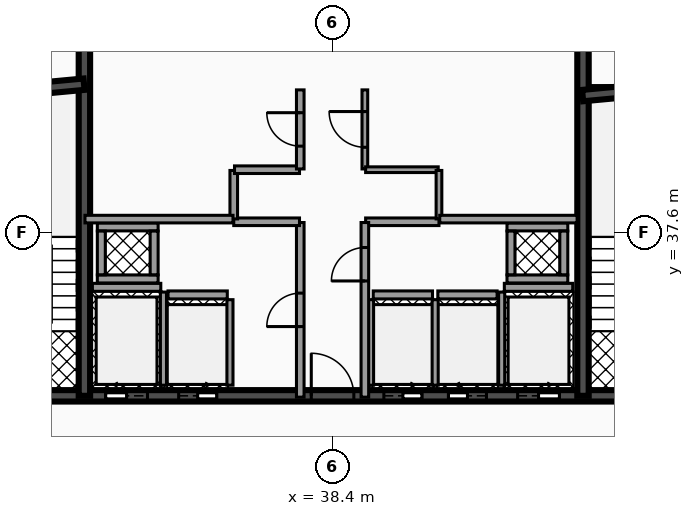
"""IFC4 building model, lengths in metres.
Left out: names, types, materials, properties, quantities, classifications, styles, units other than length and angle.
Written with IfcOpenShell. Run it as: python <this file> out.ifc"""

import sys

from ifc_helpers import new_model, si_unit, direction, frame, frame_2d, origin, place, context, subcontext, project, spatial, rectangle, extrude, element, fill, save


model = new_model("IFC4")
c1 = context("Model", 3, precision=1e-05, world=origin(), true_north=direction((0.0, 1.0)))
c2 = subcontext(c1, "Body", "Model", "MODEL_VIEW")
j1 = project(units=[si_unit("LENGTHUNIT", "METRE"), si_unit("PLANEANGLEUNIT", "RADIAN")], contexts=[c1])
p1 = place(None, origin())
s1 = spatial("IfcSite", under=j1, at=p1, CompositionType="ELEMENT")
p2 = place(p1, origin())
s2 = spatial("IfcBuilding", under=s1, at=p2, CompositionType="ELEMENT")
p3 = place(p2, frame((0.0, 0.0, 278.8)))
s3 = spatial("IfcBuildingStorey", under=s2, at=p3, CompositionType="ELEMENT", Elevation=278.8)
p4 = place(p3, frame((28.5, 33.3, 0.0), z_axis=(0.0, 0.0, 1.0), x_axis=(1.0, 0.0, 0.0)))
e1 = element("IfcWall", 1, at=p4, inside=s3, PredefinedType="SHEAR", context=c2, shape_type="SweptSolid", body=[
    extrude(rectangle(XDim=19.86, YDim=0.3, at=frame_2d((9.93, 0.0))), origin(), (0.0, 0.0, 1.0), 3.18),
])
p5 = place(p4, frame((3.93, 0.0, 0.0)))
e2 = element("IfcOpeningElement", 2, at=p5, cuts=e1, PredefinedType="OPENING", context=c2, shape_type="SweptSolid", body=[
    extrude(rectangle(XDim=1.1, YDim=2.15, at=frame_2d((0.55, 1.075))), frame((0.0, 0.16, 0.0), z_axis=(0.0, -1.0, 0.0), x_axis=(1.0, 0.0, 0.0)), (0.0, 0.0, 1.0), 0.32),
])
p6 = place(p4, frame((14.77, 0.0, 0.0)))
e3 = element("IfcOpeningElement", 3, at=p6, cuts=e1, PredefinedType="OPENING", context=c2, shape_type="SweptSolid", body=[
    extrude(rectangle(XDim=1.1, YDim=2.15, at=frame_2d((0.55, 1.075))), frame((0.0, 0.16, 0.0), z_axis=(0.0, -1.0, 0.0), x_axis=(1.0, 0.0, 0.0)), (0.0, 0.0, 1.0), 0.32),
])
p7 = place(p4, frame((11.25, 0.0, 0.0)))
e4 = element("IfcOpeningElement", 4, at=p7, cuts=e1, PredefinedType="OPENING", context=c2, shape_type="SweptSolid", body=[
    extrude(rectangle(XDim=1.0, YDim=2.1, at=frame_2d((0.5, 1.05))), frame((0.0, 0.16, 0.0), z_axis=(0.0, -1.0, 0.0), x_axis=(1.0, 0.0, 0.0)), (0.0, 0.0, 1.0), 0.32),
])
p8 = place(p4, frame((12.95, 0.0, 0.0)))
e5 = element("IfcOpeningElement", 5, at=p8, cuts=e1, PredefinedType="OPENING", context=c2, shape_type="SweptSolid", body=[
    extrude(rectangle(XDim=1.0, YDim=2.1, at=frame_2d((0.5, 1.05))), frame((0.0, 0.16, 0.0), z_axis=(0.0, -1.0, 0.0), x_axis=(1.0, 0.0, 0.0)), (0.0, 0.0, 1.0), 0.32),
])
p9 = place(p4, frame((5.85, 0.0, 0.0)))
e6 = element("IfcOpeningElement", 6, at=p9, cuts=e1, PredefinedType="OPENING", context=c2, shape_type="SweptSolid", body=[
    extrude(rectangle(XDim=1.0, YDim=2.1, at=frame_2d((0.5, 1.05))), frame((0.0, 0.16, 0.0), z_axis=(0.0, -1.0, 0.0), x_axis=(1.0, 0.0, 0.0)), (0.0, 0.0, 1.0), 0.32),
])
p10 = place(p4, frame((1.21, 0.0, 0.0)))
e7 = element("IfcOpeningElement", 7, at=p10, cuts=e1, PredefinedType="OPENING", context=c2, shape_type="SweptSolid", body=[
    extrude(rectangle(XDim=1.1, YDim=2.2, at=frame_2d((0.55, 1.1))), frame((0.0, 0.16, 0.0), z_axis=(0.0, -1.0, 0.0), x_axis=(1.0, 0.0, 0.0)), (0.0, 0.0, 1.0), 0.32),
])
p11 = place(p4, frame((9.34, 0.0, 0.0)))
e8 = element("IfcOpeningElement", 8, at=p11, cuts=e1, PredefinedType="OPENING", context=c2, shape_type="SweptSolid", body=[
    extrude(rectangle(XDim=1.12, YDim=2.05, at=frame_2d((0.56, 1.025))), frame((0.0, 0.16, 0.0), z_axis=(0.0, -1.0, 0.0), x_axis=(1.0, 0.0, 0.0)), (0.0, 0.0, 1.0), 0.32),
])
p12 = place(p4, frame((17.55, 0.0, 0.0)))
e9 = element("IfcOpeningElement", 9, at=p12, cuts=e1, PredefinedType="OPENING", context=c2, shape_type="SweptSolid", body=[
    extrude(rectangle(XDim=1.1, YDim=2.2, at=frame_2d((0.55, 1.1))), frame((0.0, 0.16, 0.0), z_axis=(0.0, -1.0, 0.0), x_axis=(1.0, 0.0, 0.0)), (0.0, 0.0, 1.0), 0.32),
])
for number, where, z_axis, x_axis in (
    (10, (31.87, 33.3, 0.0), (0.0, 0.0, 1.0), (0.0, 1.0, 0.0)),
    (11, (44.99, 33.3, 0.0), (0.0, 0.0, 1.0), (0.0, 1.0, 0.0)),
):
    element("IfcWall", number, at=place(p3, frame(where, z_axis=z_axis, x_axis=x_axis)), inside=s3, PredefinedType="SHEAR", context=c2, shape_type="SweptSolid", body=[
        extrude(rectangle(XDim=10.1, YDim=0.3, at=frame_2d((5.05, 0.0))), origin(), (0.0, 0.0, 1.0), 3.18),
    ])
p13 = place(p3, frame((28.64, 41.2, 0.0), z_axis=(0.0, 0.0, 1.0), x_axis=(0.995687118776, 0.092774789157, 0.0)))
e12 = element("IfcWall", 12, at=p13, inside=s3, PredefinedType="SHEAR", context=c2, shape_type="SweptSolid", body=[
    extrude(rectangle(XDim=3.234, YDim=0.3, at=frame_2d((1.617, 0.0))), origin(), (0.0, 0.0, 1.0), 3.18),
])
p14 = place(p3, frame((44.98, 41.2, 0.0), z_axis=(0.0, 0.0, 1.0), x_axis=(0.995686468965, 0.09278176286, 0.0)))
e13 = element("IfcWall", 13, at=p14, inside=s3, PredefinedType="SHEAR", context=c2, shape_type="SweptSolid", body=[
    extrude(rectangle(XDim=3.234, YDim=0.3, at=frame_2d((1.617, 0.0))), origin(), (0.0, 0.0, 1.0), 3.18),
])
p15 = place(p3, frame((32.08, 36.155, 0.0), z_axis=(0.0, 0.0, 1.0), x_axis=(1.0, 0.0, 0.0)))
e14 = element("IfcWall", 14, at=p15, inside=s3, PredefinedType="SOLIDWALL", context=c2, shape_type="SweptSolid", body=[
    extrude(rectangle(XDim=1.8, YDim=0.21, at=frame_2d((0.9, 0.0))), origin(), (0.0, 0.0, 1.0), 3.18),
])
p16 = place(p3, frame((33.95, 33.58, 0.0), z_axis=(0.0, 0.0, 1.0), x_axis=(0.0, 1.0, 0.0)))
e15 = element("IfcWall", 15, at=p16, inside=s3, PredefinedType="SOLIDWALL", context=c2, shape_type="SweptSolid", body=[
    extrude(rectangle(XDim=2.45, YDim=0.16, at=frame_2d((1.225, 0.0))), origin(), (0.0, 0.0, 1.0), 3.18),
])
p17 = place(p3, frame((42.92, 36.155, 0.0), z_axis=(0.0, 0.0, 1.0), x_axis=(1.0, 0.0, 0.0)))
e16 = element("IfcWall", 16, at=p17, inside=s3, PredefinedType="SOLIDWALL", context=c2, shape_type="SweptSolid", body=[
    extrude(rectangle(XDim=1.8, YDim=0.21, at=frame_2d((0.9, 0.0))), origin(), (0.0, 0.0, 1.0), 3.18),
])
p18 = place(p3, frame((42.85, 33.58, 0.0), z_axis=(0.0, 0.0, 1.0), x_axis=(0.0, 1.0, 0.0)))
e17 = element("IfcWall", 17, at=p18, inside=s3, PredefinedType="SOLIDWALL", context=c2, shape_type="SweptSolid", body=[
    extrude(rectangle(XDim=2.45, YDim=0.16, at=frame_2d((1.225, 0.0))), origin(), (0.0, 0.0, 1.0), 3.18),
])
p19 = place(p3, frame((39.47, 35.955, 0.0), z_axis=(0.0, 0.0, 1.0), x_axis=(1.0, 0.0, 0.0)))
e18 = element("IfcWall", 18, at=p19, inside=s3, PredefinedType="SOLIDWALL", context=c2, shape_type="SweptSolid", body=[
    extrude(rectangle(XDim=1.56, YDim=0.21, at=frame_2d((0.78, 0.0))), origin(), (0.0, 0.0, 1.0), 3.18),
])
for number, where, z_axis, x_axis in (
    (19, (39.4, 33.58, 0.0), (0.0, 0.0, 1.0), (0.0, 1.0, 0.0)),
    (20, (41.1, 33.58, 0.0), (0.0, 0.0, 1.0), (0.0, 1.0, 0.0)),
):
    element("IfcWall", number, at=place(p3, frame(where, z_axis=z_axis, x_axis=x_axis)), inside=s3, PredefinedType="SOLIDWALL", context=c2, shape_type="SweptSolid", body=[
        extrude(rectangle(XDim=2.25, YDim=0.16, at=frame_2d((1.125, 0.0))), origin(), (0.0, 0.0, 1.0), 3.18),
    ])
p20 = place(p3, frame((41.17, 35.955, 0.0), z_axis=(0.0, 0.0, 1.0), x_axis=(1.0, 0.0, 0.0)))
e21 = element("IfcWall", 21, at=p20, inside=s3, PredefinedType="SOLIDWALL", context=c2, shape_type="SweptSolid", body=[
    extrude(rectangle(XDim=1.56, YDim=0.21, at=frame_2d((0.78, 0.0))), origin(), (0.0, 0.0, 1.0), 3.18),
])
p21 = place(p3, frame((34.07, 35.955, 0.0), z_axis=(0.0, 0.0, 1.0), x_axis=(1.0, 0.0, 0.0)))
e22 = element("IfcWall", 22, at=p21, inside=s3, PredefinedType="SOLIDWALL", context=c2, shape_type="SweptSolid", body=[
    extrude(rectangle(XDim=1.56, YDim=0.21, at=frame_2d((0.78, 0.0))), origin(), (0.0, 0.0, 1.0), 3.18),
])
p22 = place(p3, frame((35.7, 33.58, 0.0), z_axis=(0.0, 0.0, 1.0), x_axis=(0.0, 1.0, 0.0)))
e23 = element("IfcWall", 23, at=p22, inside=s3, PredefinedType="SOLIDWALL", context=c2, shape_type="SweptSolid", body=[
    extrude(rectangle(XDim=2.25, YDim=0.16, at=frame_2d((1.125, 0.0))), origin(), (0.0, 0.0, 1.0), 3.18),
])
for number, where, z_axis, x_axis in (
    (24, (32.21, 36.375, 0.0), (0.0, 0.0, 1.0), (1.0, 0.0, 0.0)),
    (25, (32.21, 37.745, 0.0), (0.0, 0.0, 1.0), (1.0, 0.0, 0.0)),
):
    element("IfcWall", number, at=place(p3, frame(where, z_axis=z_axis, x_axis=x_axis)), inside=s3, PredefinedType="SOLIDWALL", context=c2, shape_type="SweptSolid", body=[
        extrude(rectangle(XDim=1.6, YDim=0.21, at=frame_2d((0.8, 0.0))), origin(), (0.0, 0.0, 1.0), 3.18),
    ])
for number, where, z_axis, x_axis in (
    (26, (32.315, 36.485, 0.0), (0.0, 0.0, 1.0), (0.0, 1.0, 0.0)),
    (27, (33.705, 36.485, 0.0), (0.0, 0.0, 1.0), (0.0, 1.0, 0.0)),
):
    element("IfcWall", number, at=place(p3, frame(where, z_axis=z_axis, x_axis=x_axis)), inside=s3, PredefinedType="SOLIDWALL", context=c2, shape_type="SweptSolid", body=[
        extrude(rectangle(XDim=1.15, YDim=0.21, at=frame_2d((0.575, 0.0))), origin(), (0.0, 0.0, 1.0), 3.18),
    ])
for number, where, z_axis, x_axis in (
    (28, (42.99, 36.375, 0.0), (0.0, 0.0, 1.0), (1.0, 0.0, 0.0)),
    (29, (42.99, 37.745, 0.0), (0.0, 0.0, 1.0), (1.0, 0.0, 0.0)),
):
    element("IfcWall", number, at=place(p3, frame(where, z_axis=z_axis, x_axis=x_axis)), inside=s3, PredefinedType="SOLIDWALL", context=c2, shape_type="SweptSolid", body=[
        extrude(rectangle(XDim=1.6, YDim=0.21, at=frame_2d((0.8, 0.0))), origin(), (0.0, 0.0, 1.0), 3.18),
    ])
for number, where, z_axis, x_axis in (
    (30, (43.095, 36.485, 0.0), (0.0, 0.0, 1.0), (0.0, 1.0, 0.0)),
    (31, (44.485, 36.485, 0.0), (0.0, 0.0, 1.0), (0.0, 1.0, 0.0)),
):
    element("IfcWall", number, at=place(p3, frame(where, z_axis=z_axis, x_axis=x_axis)), inside=s3, PredefinedType="SOLIDWALL", context=c2, shape_type="SweptSolid", body=[
        extrude(rectangle(XDim=1.15, YDim=0.21, at=frame_2d((0.575, 0.0))), origin(), (0.0, 0.0, 1.0), 3.18),
    ])
p23 = place(p3, frame((37.55, 33.265, 0.0), z_axis=(0.0, 0.0, 1.0), x_axis=(0.0, 1.0, 0.0)))
e32 = element("IfcWall", 32, at=p23, inside=s3, PredefinedType="PARTITIONING", context=c2, shape_type="SweptSolid", body=[
    extrude(rectangle(XDim=4.595, YDim=0.2, at=frame_2d((2.298, 0.0))), origin(), (0.0, 0.0, 1.0), 2.235),
])
p24 = place(p23, frame((1.857, 0.0, 0.0)))
e33 = element("IfcOpeningElement", 33, at=p24, cuts=e32, PredefinedType="OPENING", context=c2, shape_type="SweptSolid", body=[
    extrude(rectangle(XDim=0.88, YDim=2.05, at=frame_2d((0.44, 1.025))), frame((0.0, 0.11, 0.0), z_axis=(0.0, -1.0, 0.0), x_axis=(1.0, 0.0, 0.0)), (0.0, 0.0, 1.0), 0.22),
])
p25 = place(p3, frame((35.8, 37.88, 0.0), z_axis=(0.0, 0.0, 1.0), x_axis=(1.0, 0.0, 0.0)))
e34 = element("IfcWall", 34, at=p25, inside=s3, PredefinedType="PARTITIONING", context=c2, shape_type="SweptSolid", body=[
    extrude(rectangle(XDim=1.73, YDim=0.2, at=frame_2d((0.865, 0.0))), origin(), (0.0, 0.0, 1.0), 2.235),
])
p26 = place(p3, frame((35.8, 37.955, 0.0), z_axis=(0.0, 0.0, 1.0), x_axis=(0.0, 1.0, 0.0)))
e35 = element("IfcWall", 35, at=p26, inside=s3, PredefinedType="PARTITIONING", context=c2, shape_type="SweptSolid", body=[
    extrude(rectangle(XDim=1.275, YDim=0.2, at=frame_2d((0.637, 0.0))), origin(), (0.0, 0.0, 1.0), 2.235),
])
p27 = place(p3, frame((35.82, 39.25, 0.0), z_axis=(0.0, 0.0, 1.0), x_axis=(1.0, 0.0, 0.0)))
e36 = element("IfcWall", 36, at=p27, inside=s3, PredefinedType="PARTITIONING", context=c2, shape_type="SweptSolid", body=[
    extrude(rectangle(XDim=1.71, YDim=0.2, at=frame_2d((0.855, 0.0))), origin(), (0.0, 0.0, 1.0), 2.235),
])
p28 = place(p3, frame((37.55, 39.27, 0.0), z_axis=(0.0, 0.0, 1.0), x_axis=(0.0, 1.0, 0.0)))
e37 = element("IfcWall", 37, at=p28, inside=s3, PredefinedType="PARTITIONING", context=c2, shape_type="SweptSolid", body=[
    extrude(rectangle(XDim=2.08, YDim=0.2, at=frame_2d((1.04, 0.0))), origin(), (0.0, 0.0, 1.0), 2.235),
])
p29 = place(p28, frame((0.6, 0.0, 0.0)))
e38 = element("IfcOpeningElement", 38, at=p29, cuts=e37, PredefinedType="OPENING", context=c2, shape_type="SweptSolid", body=[
    extrude(rectangle(XDim=0.88, YDim=2.05, at=frame_2d((0.44, 1.025))), frame((0.0, 0.11, 0.0), z_axis=(0.0, -1.0, 0.0), x_axis=(1.0, 0.0, 0.0)), (0.0, 0.0, 1.0), 0.22),
])
p30 = place(p3, frame((39.27, 37.88, 0.0), z_axis=(0.0, 0.0, 1.0), x_axis=(1.0, 0.0, 0.0)))
e39 = element("IfcWall", 39, at=p30, inside=s3, PredefinedType="PARTITIONING", context=c2, shape_type="SweptSolid", body=[
    extrude(rectangle(XDim=1.93, YDim=0.2, at=frame_2d((0.965, 0.0))), origin(), (0.0, 0.0, 1.0), 2.235),
])
p31 = place(p3, frame((39.25, 33.265, 0.0), z_axis=(0.0, 0.0, 1.0), x_axis=(0.0, 1.0, 0.0)))
e40 = element("IfcWall", 40, at=p31, inside=s3, PredefinedType="PARTITIONING", context=c2, shape_type="SweptSolid", body=[
    extrude(rectangle(XDim=4.595, YDim=0.2, at=frame_2d((2.298, 0.0))), origin(), (0.0, 0.0, 1.0), 2.235),
])
p32 = place(p31, frame((3.058, 0.0, 0.0)))
e41 = element("IfcOpeningElement", 41, at=p32, cuts=e40, PredefinedType="OPENING", context=c2, shape_type="SweptSolid", body=[
    extrude(rectangle(XDim=0.88, YDim=2.05, at=frame_2d((0.44, 1.025))), frame((0.0, 0.11, 0.0), z_axis=(0.0, -1.0, 0.0), x_axis=(1.0, 0.0, 0.0)), (0.0, 0.0, 1.0), 0.22),
])
p33 = place(p3, frame((39.25, 39.27, 0.0), z_axis=(0.0, 0.0, 1.0), x_axis=(0.0, 1.0, 0.0)))
e42 = element("IfcWall", 42, at=p33, inside=s3, PredefinedType="PARTITIONING", context=c2, shape_type="SweptSolid", body=[
    extrude(rectangle(XDim=2.08, YDim=0.15, at=frame_2d((1.04, 0.0))), origin(), (0.0, 0.0, 1.0), 2.235),
])
p34 = place(p33, frame((0.57, 0.0, 0.0)))
e43 = element("IfcOpeningElement", 43, at=p34, cuts=e42, PredefinedType="OPENING", context=c2, shape_type="SweptSolid", body=[
    extrude(rectangle(XDim=0.94, YDim=2.05, at=frame_2d((0.47, 1.025))), frame((0.0, 0.085, 0.0), z_axis=(0.0, -1.0, 0.0), x_axis=(1.0, 0.0, 0.0)), (0.0, 0.0, 1.0), 0.17),
])
p35 = place(p3, frame((39.27, 39.25, 0.0), z_axis=(0.0, 0.0, 1.0), x_axis=(1.0, 0.0, 0.0)))
e44 = element("IfcWall", 44, at=p35, inside=s3, PredefinedType="PARTITIONING", context=c2, shape_type="SweptSolid", body=[
    extrude(rectangle(XDim=1.91, YDim=0.15, at=frame_2d((0.955, 0.0))), origin(), (0.0, 0.0, 1.0), 2.235),
])
p36 = place(p3, frame((41.2, 37.955, 0.0), z_axis=(0.0, 0.0, 1.0), x_axis=(0.0, 1.0, 0.0)))
e45 = element("IfcWall", 45, at=p36, inside=s3, PredefinedType="PARTITIONING", context=c2, shape_type="SweptSolid", body=[
    extrude(rectangle(XDim=1.275, YDim=0.15, at=frame_2d((0.637, 0.0))), origin(), (0.0, 0.0, 1.0), 2.235),
])
p37 = place(p3, frame((31.885, 37.95, 0.0), z_axis=(0.0, 0.0, 1.0), x_axis=(1.0, 0.0, 0.0)))
e46 = element("IfcWall", 46, at=p37, inside=s3, PredefinedType="PARTITIONING", context=c2, shape_type="SweptSolid", body=[
    extrude(rectangle(XDim=3.895, YDim=0.2, at=frame_2d((1.948, 0.0))), origin(), (0.0, 0.0, 1.0), 2.235),
])
p38 = place(p3, frame((41.22, 37.95, 0.0), z_axis=(0.0, 0.0, 1.0), x_axis=(1.0, 0.0, 0.0)))
e47 = element("IfcWall", 47, at=p38, inside=s3, PredefinedType="PARTITIONING", context=c2, shape_type="SweptSolid", body=[
    extrude(rectangle(XDim=3.615, YDim=0.2, at=frame_2d((1.808, 0.0))), origin(), (0.0, 0.0, 1.0), 2.235),
])
p39 = place(p5, origin())
e48 = element("IfcDoor", 48, at=p39, inside=s3, OperationType="SLIDING_TO_LEFT", PredefinedType="DOOR", context=c2, shape_type="SweptSolid", body=[
    extrude(rectangle(XDim=1.1, YDim=2.15, at=frame_2d((0.55, 1.075))), frame((0.0, 0.025, 0.0), z_axis=(0.0, -1.0, 0.0), x_axis=(1.0, 0.0, 0.0)), (0.0, 0.0, 1.0), 0.05),
])
fill(e2, e48)
p40 = place(p6, origin())
e49 = element("IfcDoor", 49, at=p40, inside=s3, OperationType="SLIDING_TO_RIGHT", PredefinedType="DOOR", context=c2, shape_type="SweptSolid", body=[
    extrude(rectangle(XDim=1.1, YDim=2.15, at=frame_2d((0.55, 1.075))), frame((0.0, 0.025, 0.0), z_axis=(0.0, -1.0, 0.0), x_axis=(1.0, 0.0, 0.0)), (0.0, 0.0, 1.0), 0.05),
])
fill(e3, e49)
p41 = place(p7, origin())
e50 = element("IfcDoor", 50, at=p41, inside=s3, OperationType="SLIDING_TO_RIGHT", PredefinedType="DOOR", context=c2, shape_type="SweptSolid", body=[
    extrude(rectangle(XDim=1.0, YDim=2.1, at=frame_2d((0.5, 1.05))), frame((0.0, 0.025, 0.0), z_axis=(0.0, -1.0, 0.0), x_axis=(1.0, 0.0, 0.0)), (0.0, 0.0, 1.0), 0.05),
])
fill(e4, e50)
p42 = place(p8, origin())
e51 = element("IfcDoor", 51, at=p42, inside=s3, OperationType="SLIDING_TO_LEFT", PredefinedType="DOOR", context=c2, shape_type="SweptSolid", body=[
    extrude(rectangle(XDim=1.0, YDim=2.1, at=frame_2d((0.5, 1.05))), frame((0.0, 0.025, 0.0), z_axis=(0.0, -1.0, 0.0), x_axis=(1.0, 0.0, 0.0)), (0.0, 0.0, 1.0), 0.05),
])
fill(e5, e51)
p43 = place(p9, origin())
e52 = element("IfcDoor", 52, at=p43, inside=s3, OperationType="SLIDING_TO_RIGHT", PredefinedType="DOOR", context=c2, shape_type="SweptSolid", body=[
    extrude(rectangle(XDim=1.0, YDim=2.1, at=frame_2d((0.5, 1.05))), frame((0.0, 0.025, 0.0), z_axis=(0.0, -1.0, 0.0), x_axis=(1.0, 0.0, 0.0)), (0.0, 0.0, 1.0), 0.05),
])
fill(e6, e52)
p44 = place(p11, origin())
e53 = element("IfcDoor", 53, at=p44, inside=s3, OperationType="SINGLE_SWING_LEFT", PredefinedType="DOOR", context=c2, shape_type="SweptSolid", body=[
    extrude(rectangle(XDim=1.12, YDim=2.05, at=frame_2d((0.56, 1.025))), frame((0.0, 0.025, 0.0), z_axis=(0.0, -1.0, 0.0), x_axis=(1.0, 0.0, 0.0)), (0.0, 0.0, 1.0), 0.05),
])
fill(e8, e53)
p45 = place(p24, origin())
e54 = element("IfcDoor", 54, at=p45, inside=s3, OperationType="SINGLE_SWING_LEFT", PredefinedType="DOOR", context=c2, shape_type="SweptSolid", body=[
    extrude(rectangle(XDim=0.88, YDim=2.05, at=frame_2d((0.44, 1.025))), frame((0.0, 0.025, 0.0), z_axis=(0.0, -1.0, 0.0), x_axis=(1.0, 0.0, 0.0)), (0.0, 0.0, 1.0), 0.05),
])
fill(e33, e54)
p46 = place(p29, origin())
e55 = element("IfcDoor", 55, at=p46, inside=s3, OperationType="SINGLE_SWING_RIGHT", PredefinedType="DOOR", context=c2, shape_type="SweptSolid", body=[
    extrude(rectangle(XDim=0.88, YDim=2.05, at=frame_2d((0.44, 1.025))), frame((0.0, 0.025, 0.0), z_axis=(0.0, -1.0, 0.0), x_axis=(1.0, 0.0, 0.0)), (0.0, 0.0, 1.0), 0.05),
])
fill(e38, e55)
p47 = place(p32, origin())
e56 = element("IfcDoor", 56, at=p47, inside=s3, OperationType="SINGLE_SWING_LEFT", PredefinedType="DOOR", context=c2, shape_type="SweptSolid", body=[
    extrude(rectangle(XDim=0.88, YDim=2.05, at=frame_2d((0.44, 1.025))), frame((0.0, 0.025, 0.0), z_axis=(0.0, -1.0, 0.0), x_axis=(1.0, 0.0, 0.0)), (0.0, 0.0, 1.0), 0.05),
])
fill(e41, e56)
p48 = place(p34, origin())
e57 = element("IfcDoor", 57, at=p48, inside=s3, OperationType="SINGLE_SWING_RIGHT", PredefinedType="DOOR", context=c2, shape_type="SweptSolid", body=[
    extrude(rectangle(XDim=0.94, YDim=2.05, at=frame_2d((0.47, 1.025))), frame((0.0, 0.025, 0.0), z_axis=(0.0, -1.0, 0.0), x_axis=(1.0, 0.0, 0.0)), (0.0, 0.0, 1.0), 0.05),
])
fill(e43, e57)
save(model, sys.argv[1])
